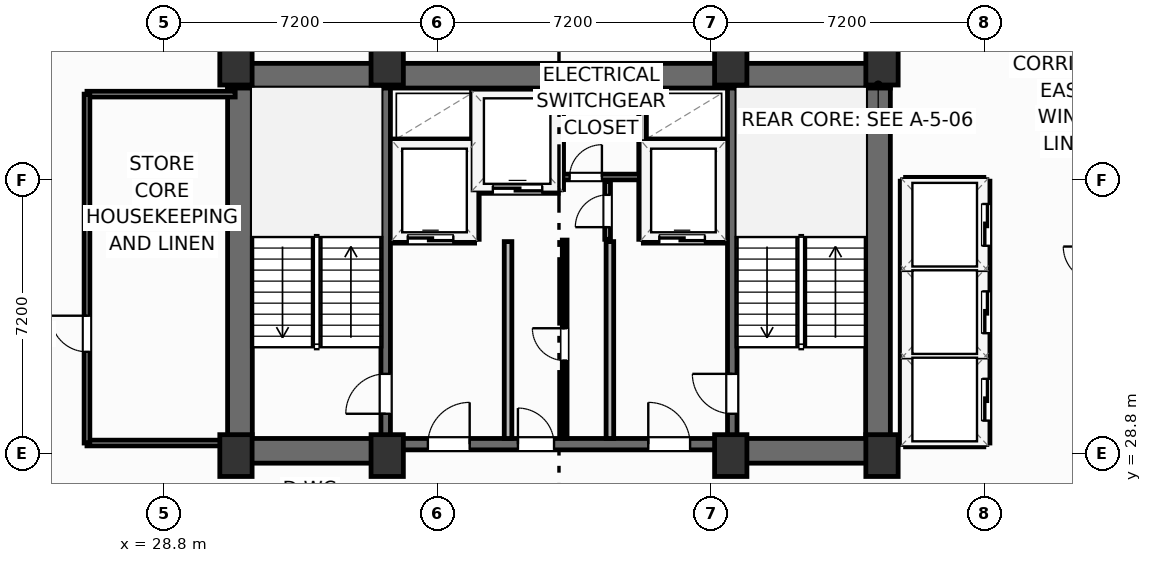
"""IFC4 building model, lengths in metres.
Left out: names, types, materials, properties, quantities, classifications, styles, units other than length and angle.
Written with IfcOpenShell. Run it as: python <this file> out.ifc"""

import sys

from ifc_helpers import new_model, si_unit, direction, frame, frame_2d, origin, origin_2d, place, context, subcontext, project, spatial, rectangle, extrude, element, fill, save


model = new_model("IFC4")
c1 = context("Model", 3, precision=1e-05, world=origin(), true_north=direction((0.0, 1.0)))
c2 = subcontext(c1, "Body", "Model", "MODEL_VIEW")
j1 = project(units=[si_unit("LENGTHUNIT", "METRE"), si_unit("PLANEANGLEUNIT", "RADIAN")], contexts=[c1])
p1 = place(None, origin())
s1 = spatial("IfcSite", under=j1, at=p1, CompositionType="ELEMENT")
p2 = place(p1, origin())
s2 = spatial("IfcBuilding", under=s1, at=p2, CompositionType="ELEMENT")
p3 = place(p2, frame((0.0, 0.0, 196.8)))
s3 = spatial("IfcBuildingStorey", under=s2, at=p3, CompositionType="ELEMENT", Elevation=196.8)
for number, where, z_axis, x_axis in (
    (1, (30.7, 28.75, 0.0), (0.0, 0.0, 1.0), (1.0, 0.0, 0.0)),
    (2, (34.68, 28.75, 0.0), (0.0, 0.0, 1.0), (1.0, 0.0, 0.0)),
    (3, (43.72, 28.75, 0.0), (0.0, 0.0, 1.0), (1.0, 0.0, 0.0)),
    (4, (47.7, 28.75, 0.0), (0.0, 0.0, 1.0), (1.0, 0.0, 0.0)),
    (5, (30.7, 39.05, 0.0), (0.0, 0.0, 1.0), (1.0, 0.0, 0.0)),
    (6, (34.68, 39.05, 0.0), (0.0, 0.0, 1.0), (1.0, 0.0, 0.0)),
    (7, (43.72, 39.05, 0.0), (0.0, 0.0, 1.0), (1.0, 0.0, 0.0)),
    (8, (47.7, 39.05, 0.0), (0.0, 0.0, 1.0), (1.0, 0.0, 0.0)),
):
    element("IfcColumn", number, at=place(p3, frame(where, z_axis=z_axis, x_axis=x_axis)), inside=s3, PredefinedType="COLUMN", context=c2, shape_type="SweptSolid", body=[
        extrude(rectangle(XDim=0.85, YDim=1.1, at=origin_2d()), origin(), (0.0, 0.0, 1.0), 3.7),
    ])
p4 = place(p3, frame((30.48, 38.745, 0.0), z_axis=(0.0, 0.0, 1.0), x_axis=(1.0, 0.0, 0.0)))
e9 = element("IfcWall", 9, at=p4, inside=s3, PredefinedType="SHEAR", context=c2, shape_type="SweptSolid", body=[
    extrude(rectangle(XDim=17.44, YDim=0.65, at=frame_2d((8.72, 0.0))), origin(), (0.0, 0.0, 1.0), 3.45),
])
for number, where, z_axis, x_axis in (
    (10, (30.805, 29.2, 0.0), (0.0, 0.0, 1.0), (0.0, 1.0, 0.0)),
    (11, (47.595, 29.2, 0.0), (0.0, 0.0, 1.0), (0.0, 1.0, 0.0)),
):
    element("IfcWall", number, at=place(p3, frame(where, z_axis=z_axis, x_axis=x_axis)), inside=s3, PredefinedType="SHEAR", context=c2, shape_type="SweptSolid", body=[
        extrude(rectangle(XDim=9.22, YDim=0.65, at=frame_2d((4.61, 0.0))), origin(), (0.0, 0.0, 1.0), 3.45),
    ])
p5 = place(p3, frame((30.48, 28.875, 0.0), z_axis=(0.0, 0.0, 1.0), x_axis=(1.0, 0.0, 0.0)))
e12 = element("IfcWall", 12, at=p5, inside=s3, PredefinedType="SHEAR", context=c2, shape_type="SweptSolid", body=[
    extrude(rectangle(XDim=4.32, YDim=0.65, at=frame_2d((2.16, 0.0))), origin(), (0.0, 0.0, 1.0), 3.45),
])
p6 = place(p3, frame((43.6, 28.875, 0.0), z_axis=(0.0, 0.0, 1.0), x_axis=(1.0, 0.0, 0.0)))
e13 = element("IfcWall", 13, at=p6, inside=s3, PredefinedType="SHEAR", context=c2, shape_type="SweptSolid", body=[
    extrude(rectangle(XDim=4.32, YDim=0.65, at=frame_2d((2.16, 0.0))), origin(), (0.0, 0.0, 1.0), 3.45),
])
p7 = place(p3, frame((34.8, 29.05, 0.0), z_axis=(0.0, 0.0, 1.0), x_axis=(1.0, 0.0, 0.0)))
e14 = element("IfcWall", 14, at=p7, inside=s3, PredefinedType="SHEAR", context=c2, shape_type="SweptSolid", body=[
    extrude(rectangle(XDim=8.8, YDim=0.3, at=frame_2d((4.4, 0.0))), origin(), (0.0, 0.0, 1.0), 3.45),
])
p8 = place(p7, frame((0.95, 0.0, 0.0)))
e15 = element("IfcOpeningElement", 15, at=p8, cuts=e14, PredefinedType="OPENING", context=c2, shape_type="SweptSolid", body=[
    extrude(rectangle(XDim=1.1, YDim=2.15, at=frame_2d((0.55, 1.075))), frame((0.0, 0.16, 0.0), z_axis=(0.0, -1.0, 0.0), x_axis=(1.0, 0.0, 0.0)), (0.0, 0.0, 1.0), 0.32),
])
p9 = place(p7, frame((6.75, 0.0, 0.0)))
e16 = element("IfcOpeningElement", 16, at=p9, cuts=e14, PredefinedType="OPENING", context=c2, shape_type="SweptSolid", body=[
    extrude(rectangle(XDim=1.1, YDim=2.15, at=frame_2d((0.55, 1.075))), frame((0.0, 0.16, 0.0), z_axis=(0.0, -1.0, 0.0), x_axis=(1.0, 0.0, 0.0)), (0.0, 0.0, 1.0), 0.32),
])
p10 = place(p7, frame((3.32, 0.0, 0.0)))
e17 = element("IfcOpeningElement", 17, at=p10, cuts=e14, PredefinedType="OPENING", context=c2, shape_type="SweptSolid", body=[
    extrude(rectangle(XDim=0.95, YDim=2.15, at=frame_2d((0.475, 1.075))), frame((0.0, 0.16, 0.0), z_axis=(0.0, -1.0, 0.0), x_axis=(1.0, 0.0, 0.0)), (0.0, 0.0, 1.0), 0.32),
])
p11 = place(p3, frame((34.64, 29.2, 0.0), z_axis=(0.0, 0.0, 1.0), x_axis=(0.0, 1.0, 0.0)))
e18 = element("IfcWall", 18, at=p11, inside=s3, PredefinedType="SHEAR", context=c2, shape_type="SweptSolid", body=[
    extrude(rectangle(XDim=9.22, YDim=0.25, at=frame_2d((4.61, 0.0))), origin(), (0.0, 0.0, 1.0), 3.45),
])
p12 = place(p11, frame((0.65, 0.0, 0.0)))
e19 = element("IfcOpeningElement", 19, at=p12, cuts=e18, PredefinedType="OPENING", context=c2, shape_type="SweptSolid", body=[
    extrude(rectangle(XDim=1.05, YDim=2.15, at=frame_2d((0.525, 1.075))), frame((0.0, 0.135, 0.0), z_axis=(0.0, -1.0, 0.0), x_axis=(1.0, 0.0, 0.0)), (0.0, 0.0, 1.0), 0.27),
])
p13 = place(p3, frame((43.76, 29.2, 0.0), z_axis=(0.0, 0.0, 1.0), x_axis=(0.0, 1.0, 0.0)))
e20 = element("IfcWall", 20, at=p13, inside=s3, PredefinedType="SHEAR", context=c2, shape_type="SweptSolid", body=[
    extrude(rectangle(XDim=9.22, YDim=0.25, at=frame_2d((4.61, 0.0))), origin(), (0.0, 0.0, 1.0), 3.45),
])
p14 = place(p13, frame((0.65, 0.0, 0.0)))
e21 = element("IfcOpeningElement", 21, at=p14, cuts=e20, PredefinedType="OPENING", context=c2, shape_type="SweptSolid", body=[
    extrude(rectangle(XDim=1.05, YDim=2.15, at=frame_2d((0.525, 1.075))), frame((0.0, 0.135, 0.0), z_axis=(0.0, -1.0, 0.0), x_axis=(1.0, 0.0, 0.0)), (0.0, 0.0, 1.0), 0.27),
])
for number, where, z_axis, x_axis in (
    (22, (37.86, 29.2, 0.0), (0.0, 0.0, 1.0), (0.0, 1.0, 0.0)),
    (23, (40.54, 29.2, 0.0), (0.0, 0.0, 1.0), (0.0, 1.0, 0.0)),
):
    element("IfcWall", number, at=place(p3, frame(where, z_axis=z_axis, x_axis=x_axis)), inside=s3, PredefinedType="PARTITIONING", context=c2, shape_type="SweptSolid", body=[
        extrude(rectangle(XDim=5.18, YDim=0.2, at=frame_2d((2.59, 0.0))), origin(), (0.0, 0.0, 1.0), 3.45),
    ])
p15 = place(p3, frame((34.8, 34.44, 0.0), z_axis=(0.0, 0.0, 1.0), x_axis=(1.0, 0.0, 0.0)))
e24 = element("IfcWall", 24, at=p15, inside=s3, PredefinedType="PARTITIONING", context=c2, shape_type="SweptSolid", body=[
    extrude(rectangle(XDim=2.18, YDim=0.2, at=frame_2d((1.09, 0.0))), origin(), (0.0, 0.0, 1.0), 3.45),
])
p16 = place(p15, frame((0.42, 0.0, 0.0)))
e25 = element("IfcOpeningElement", 25, at=p16, cuts=e24, PredefinedType="OPENING", context=c2, shape_type="SweptSolid", body=[
    extrude(rectangle(XDim=1.2, YDim=2.2, at=frame_2d((0.6, 1.1))), frame((0.0, 0.11, 0.0), z_axis=(0.0, -1.0, 0.0), x_axis=(1.0, 0.0, 0.0)), (0.0, 0.0, 1.0), 0.22),
])
p17 = place(p3, frame((34.8, 36.98, 0.0), z_axis=(0.0, 0.0, 1.0), x_axis=(1.0, 0.0, 0.0)))
e26 = element("IfcWall", 26, at=p17, inside=s3, PredefinedType="PARTITIONING", context=c2, shape_type="SweptSolid", body=[
    extrude(rectangle(XDim=2.18, YDim=0.2, at=frame_2d((1.09, 0.0))), origin(), (0.0, 0.0, 1.0), 3.45),
])
p18 = place(p3, frame((37.0, 34.44, 0.0), z_axis=(0.0, 0.0, 1.0), x_axis=(0.0, 1.0, 0.0)))
e27 = element("IfcWall", 27, at=p18, inside=s3, PredefinedType="PARTITIONING", context=c2, shape_type="SweptSolid", body=[
    extrude(rectangle(XDim=3.9, YDim=0.2, at=frame_2d((1.95, 0.0))), origin(), (0.0, 0.0, 1.0), 3.45),
])
p19 = place(p3, frame((41.42, 34.44, 0.0), z_axis=(0.0, 0.0, 1.0), x_axis=(1.0, 0.0, 0.0)))
e28 = element("IfcWall", 28, at=p19, inside=s3, PredefinedType="PARTITIONING", context=c2, shape_type="SweptSolid", body=[
    extrude(rectangle(XDim=2.18, YDim=0.2, at=frame_2d((1.09, 0.0))), origin(), (0.0, 0.0, 1.0), 3.45),
])
p20 = place(p19, frame((0.42, 0.0, 0.0)))
e29 = element("IfcOpeningElement", 29, at=p20, cuts=e28, PredefinedType="OPENING", context=c2, shape_type="SweptSolid", body=[
    extrude(rectangle(XDim=1.2, YDim=2.2, at=frame_2d((0.6, 1.1))), frame((0.0, 0.11, 0.0), z_axis=(0.0, -1.0, 0.0), x_axis=(1.0, 0.0, 0.0)), (0.0, 0.0, 1.0), 0.22),
])
p21 = place(p3, frame((41.42, 36.98, 0.0), z_axis=(0.0, 0.0, 1.0), x_axis=(1.0, 0.0, 0.0)))
e30 = element("IfcWall", 30, at=p21, inside=s3, PredefinedType="PARTITIONING", context=c2, shape_type="SweptSolid", body=[
    extrude(rectangle(XDim=2.18, YDim=0.2, at=frame_2d((1.09, 0.0))), origin(), (0.0, 0.0, 1.0), 3.45),
])
p22 = place(p3, frame((41.4, 34.44, 0.0), z_axis=(0.0, 0.0, 1.0), x_axis=(0.0, 1.0, 0.0)))
e31 = element("IfcWall", 31, at=p22, inside=s3, PredefinedType="PARTITIONING", context=c2, shape_type="SweptSolid", body=[
    extrude(rectangle(XDim=3.9, YDim=0.2, at=frame_2d((1.95, 0.0))), origin(), (0.0, 0.0, 1.0), 3.45),
])
p23 = place(p3, frame((37.06, 35.75, 0.0), z_axis=(0.0, 0.0, 1.0), x_axis=(1.0, 0.0, 0.0)))
e32 = element("IfcWall", 32, at=p23, inside=s3, PredefinedType="PARTITIONING", context=c2, shape_type="SweptSolid", body=[
    extrude(rectangle(XDim=2.12, YDim=0.2, at=frame_2d((1.06, 0.0))), origin(), (0.0, 0.0, 1.0), 3.45),
])
p24 = place(p23, frame((0.4, 0.0, 0.0)))
e33 = element("IfcOpeningElement", 33, at=p24, cuts=e32, PredefinedType="OPENING", context=c2, shape_type="SweptSolid", body=[
    extrude(rectangle(XDim=1.3, YDim=2.2, at=frame_2d((0.65, 1.1))), frame((0.0, 0.11, 0.0), z_axis=(0.0, -1.0, 0.0), x_axis=(1.0, 0.0, 0.0)), (0.0, 0.0, 1.0), 0.22),
])
p25 = place(p3, frame((39.22, 35.75, 0.0), z_axis=(0.0, 0.0, 1.0), x_axis=(0.0, 1.0, 0.0)))
e34 = element("IfcWall", 34, at=p25, inside=s3, PredefinedType="PARTITIONING", context=c2, shape_type="SweptSolid", body=[
    extrude(rectangle(XDim=2.59, YDim=0.2, at=frame_2d((1.295, 0.0))), origin(), (0.0, 0.0, 1.0), 3.45),
])
p26 = place(p3, frame((39.3, 36.08, 0.0), z_axis=(0.0, 0.0, 1.0), x_axis=(1.0, 0.0, 0.0)))
e35 = element("IfcWall", 35, at=p26, inside=s3, PredefinedType="PARTITIONING", context=c2, shape_type="SweptSolid", body=[
    extrude(rectangle(XDim=2.02, YDim=0.15, at=frame_2d((1.01, 0.0))), origin(), (0.0, 0.0, 1.0), 3.45),
])
p27 = place(p26, frame((0.18, 0.0, 0.0)))
e36 = element("IfcOpeningElement", 36, at=p27, cuts=e35, PredefinedType="OPENING", context=c2, shape_type="SweptSolid", body=[
    extrude(rectangle(XDim=0.85, YDim=2.05, at=frame_2d((0.425, 1.025))), frame((0.0, 0.085, 0.0), z_axis=(0.0, -1.0, 0.0), x_axis=(1.0, 0.0, 0.0)), (0.0, 0.0, 1.0), 0.17),
])
p28 = place(p3, frame((40.48, 34.44, 0.0), z_axis=(0.0, 0.0, 1.0), x_axis=(0.0, 1.0, 0.0)))
e37 = element("IfcWall", 37, at=p28, inside=s3, PredefinedType="PARTITIONING", context=c2, shape_type="SweptSolid", body=[
    extrude(rectangle(XDim=1.52, YDim=0.15, at=frame_2d((0.76, 0.0))), origin(), (0.0, 0.0, 1.0), 3.45),
])
p29 = place(p28, frame((0.32, 0.0, 0.0)))
e38 = element("IfcOpeningElement", 38, at=p29, cuts=e37, PredefinedType="OPENING", context=c2, shape_type="SweptSolid", body=[
    extrude(rectangle(XDim=0.85, YDim=2.05, at=frame_2d((0.425, 1.025))), frame((0.0, 0.085, 0.0), z_axis=(0.0, -1.0, 0.0), x_axis=(1.0, 0.0, 0.0)), (0.0, 0.0, 1.0), 0.17),
])
p30 = place(p3, frame((39.35, 29.2, 0.0), z_axis=(0.0, 0.0, 1.0), x_axis=(0.0, 1.0, 0.0)))
e39 = element("IfcWall", 39, at=p30, inside=s3, PredefinedType="PARTITIONING", context=c2, shape_type="SweptSolid", body=[
    extrude(rectangle(XDim=5.22, YDim=0.125, at=frame_2d((2.61, 0.0))), origin(), (0.0, 0.0, 1.0), 3.45),
])
p31 = place(p30, frame((2.05, 0.0, 0.0)))
e40 = element("IfcOpeningElement", 40, at=p31, cuts=e39, PredefinedType="OPENING", context=c2, shape_type="SweptSolid", body=[
    extrude(rectangle(XDim=0.85, YDim=2.05, at=frame_2d((0.425, 1.025))), frame((0.0, 0.073, 0.0), z_axis=(0.0, -1.0, 0.0), x_axis=(1.0, 0.0, 0.0)), (0.0, 0.0, 1.0), 0.145),
])
p32 = place(p3, frame((26.78, 29.08, 0.0), z_axis=(0.0, 0.0, 1.0), x_axis=(1.0, 0.0, 0.0)))
e41 = element("IfcWall", 41, at=p32, inside=s3, PredefinedType="PARTITIONING", context=c2, shape_type="SweptSolid", body=[
    extrude(rectangle(XDim=3.7, YDim=0.15, at=frame_2d((1.85, 0.0))), origin(), (0.0, 0.0, 1.0), 3.45),
])
p33 = place(p3, frame((26.78, 38.26, 0.0), z_axis=(0.0, 0.0, 1.0), x_axis=(1.0, 0.0, 0.0)))
e42 = element("IfcWall", 42, at=p33, inside=s3, PredefinedType="PARTITIONING", context=c2, shape_type="SweptSolid", body=[
    extrude(rectangle(XDim=3.9, YDim=0.15, at=frame_2d((1.95, 0.0))), origin(), (0.0, 0.0, 1.0), 3.45),
])
p34 = place(p3, frame((26.78, 29.08, 0.0), z_axis=(0.0, 0.0, 1.0), x_axis=(0.0, 1.0, 0.0)))
e43 = element("IfcWall", 43, at=p34, inside=s3, PredefinedType="PARTITIONING", context=c2, shape_type="SweptSolid", body=[
    extrude(rectangle(XDim=9.18, YDim=0.15, at=frame_2d((4.59, 0.0))), origin(), (0.0, 0.0, 1.0), 3.45),
])
p35 = place(p34, frame((2.4, 0.0, 0.0)))
e44 = element("IfcOpeningElement", 44, at=p35, cuts=e43, PredefinedType="OPENING", context=c2, shape_type="SweptSolid", body=[
    extrude(rectangle(XDim=0.95, YDim=2.05, at=frame_2d((0.475, 1.025))), frame((0.0, 0.085, 0.0), z_axis=(0.0, -1.0, 0.0), x_axis=(1.0, 0.0, 0.0)), (0.0, 0.0, 1.0), 0.17),
])
for number, where, z_axis, x_axis in (
    (45, (48.32, 31.375, 0.0), (0.0, 0.0, 1.0), (1.0, 0.0, 0.0)),
    (46, (48.32, 33.675, 0.0), (0.0, 0.0, 1.0), (1.0, 0.0, 0.0)),
):
    element("IfcWall", number, at=place(p3, frame(where, z_axis=z_axis, x_axis=x_axis)), inside=s3, PredefinedType="PARTITIONING", context=c2, shape_type="SweptSolid", body=[
        extrude(rectangle(XDim=2.06, YDim=0.2, at=frame_2d((1.03, 0.0))), origin(), (0.0, 0.0, 1.0), 3.45),
    ])
p36 = place(p3, frame((48.32, 29.08, 0.0), z_axis=(0.0, 0.0, 1.0), x_axis=(1.0, 0.0, 0.0)))
e47 = element("IfcWall", 47, at=p36, inside=s3, PredefinedType="PARTITIONING", context=c2, shape_type="SweptSolid", body=[
    extrude(rectangle(XDim=2.06, YDim=0.2, at=frame_2d((1.03, 0.0))), origin(), (0.0, 0.0, 1.0), 2.662),
])
p37 = place(p3, frame((48.32, 35.97, 0.0), z_axis=(0.0, 0.0, 1.0), x_axis=(1.0, 0.0, 0.0)))
e48 = element("IfcWall", 48, at=p37, inside=s3, PredefinedType="PARTITIONING", context=c2, shape_type="SweptSolid", body=[
    extrude(rectangle(XDim=2.06, YDim=0.2, at=frame_2d((1.03, 0.0))), origin(), (0.0, 0.0, 1.0), 3.45),
])
p38 = place(p3, frame((48.28, 29.08, 0.0), z_axis=(0.0, 0.0, 1.0), x_axis=(0.0, 1.0, 0.0)))
e49 = element("IfcWall", 49, at=p38, inside=s3, PredefinedType="PARTITIONING", context=c2, shape_type="SweptSolid", body=[
    extrude(rectangle(XDim=6.89, YDim=0.2, at=frame_2d((3.445, 0.0))), origin(), (0.0, 0.0, 1.0), 3.45),
])
p39 = place(p3, frame((50.44, 29.08, 0.0), z_axis=(0.0, 0.0, 1.0), x_axis=(0.0, 1.0, 0.0)))
e50 = element("IfcWall", 50, at=p39, inside=s3, PredefinedType="PARTITIONING", context=c2, shape_type="SweptSolid", body=[
    extrude(rectangle(XDim=6.89, YDim=0.2, at=frame_2d((3.445, 0.0))), origin(), (0.0, 0.0, 1.0), 3.45),
])
p40 = place(p39, frame((0.59, 0.0, 0.0)))
e51 = element("IfcOpeningElement", 51, at=p40, cuts=e50, PredefinedType="OPENING", context=c2, shape_type="SweptSolid", body=[
    extrude(rectangle(XDim=1.1, YDim=2.15, at=frame_2d((0.55, 1.075))), frame((0.0, 0.11, 0.0), z_axis=(0.0, -1.0, 0.0), x_axis=(1.0, 0.0, 0.0)), (0.0, 0.0, 1.0), 0.22),
])
p41 = place(p39, frame((2.89, 0.0, 0.0)))
e52 = element("IfcOpeningElement", 52, at=p41, cuts=e50, PredefinedType="OPENING", context=c2, shape_type="SweptSolid", body=[
    extrude(rectangle(XDim=1.1, YDim=2.15, at=frame_2d((0.55, 1.075))), frame((0.0, 0.11, 0.0), z_axis=(0.0, -1.0, 0.0), x_axis=(1.0, 0.0, 0.0)), (0.0, 0.0, 1.0), 0.22),
])
p42 = place(p39, frame((5.19, 0.0, 0.0)))
e53 = element("IfcOpeningElement", 53, at=p42, cuts=e50, PredefinedType="OPENING", context=c2, shape_type="SweptSolid", body=[
    extrude(rectangle(XDim=1.1, YDim=2.15, at=frame_2d((0.55, 1.075))), frame((0.0, 0.11, 0.0), z_axis=(0.0, -1.0, 0.0), x_axis=(1.0, 0.0, 0.0)), (0.0, 0.0, 1.0), 0.22),
])
p43 = place(p12, origin())
e54 = element("IfcDoor", 54, at=p43, inside=s3, OperationType="SINGLE_SWING_LEFT", PredefinedType="DOOR", context=c2, shape_type="SweptSolid", body=[
    extrude(rectangle(XDim=1.05, YDim=2.15, at=frame_2d((0.525, 1.075))), frame((0.0, 0.025, 0.0), z_axis=(0.0, -1.0, 0.0), x_axis=(1.0, 0.0, 0.0)), (0.0, 0.0, 1.0), 0.05),
])
fill(e19, e54)
p44 = place(p14, origin())
e55 = element("IfcDoor", 55, at=p44, inside=s3, OperationType="SINGLE_SWING_RIGHT", PredefinedType="DOOR", context=c2, shape_type="SweptSolid", body=[
    extrude(rectangle(XDim=1.05, YDim=2.15, at=frame_2d((0.525, 1.075))), frame((0.0, 0.025, 0.0), z_axis=(0.0, -1.0, 0.0), x_axis=(1.0, 0.0, 0.0)), (0.0, 0.0, 1.0), 0.05),
])
fill(e21, e55)
p45 = place(p8, origin())
e56 = element("IfcDoor", 56, at=p45, inside=s3, OperationType="SINGLE_SWING_RIGHT", PredefinedType="DOOR", context=c2, shape_type="SweptSolid", body=[
    extrude(rectangle(XDim=1.1, YDim=2.15, at=frame_2d((0.55, 1.075))), frame((0.0, 0.025, 0.0), z_axis=(0.0, -1.0, 0.0), x_axis=(1.0, 0.0, 0.0)), (0.0, 0.0, 1.0), 0.05),
])
fill(e15, e56)
p46 = place(p9, origin())
e57 = element("IfcDoor", 57, at=p46, inside=s3, OperationType="SINGLE_SWING_LEFT", PredefinedType="DOOR", context=c2, shape_type="SweptSolid", body=[
    extrude(rectangle(XDim=1.1, YDim=2.15, at=frame_2d((0.55, 1.075))), frame((0.0, 0.025, 0.0), z_axis=(0.0, -1.0, 0.0), x_axis=(1.0, 0.0, 0.0)), (0.0, 0.0, 1.0), 0.05),
])
fill(e16, e57)
p47 = place(p16, origin())
e58 = element("IfcDoor", 58, at=p47, inside=s3, OperationType="SLIDING_TO_LEFT", PredefinedType="DOOR", context=c2, shape_type="SweptSolid", body=[
    extrude(rectangle(XDim=1.2, YDim=2.2, at=frame_2d((0.6, 1.1))), frame((0.0, 0.025, 0.0), z_axis=(0.0, -1.0, 0.0), x_axis=(1.0, 0.0, 0.0)), (0.0, 0.0, 1.0), 0.05),
])
fill(e25, e58)
p48 = place(p20, origin())
e59 = element("IfcDoor", 59, at=p48, inside=s3, OperationType="SLIDING_TO_LEFT", PredefinedType="DOOR", context=c2, shape_type="SweptSolid", body=[
    extrude(rectangle(XDim=1.2, YDim=2.2, at=frame_2d((0.6, 1.1))), frame((0.0, 0.025, 0.0), z_axis=(0.0, -1.0, 0.0), x_axis=(1.0, 0.0, 0.0)), (0.0, 0.0, 1.0), 0.05),
])
fill(e29, e59)
p49 = place(p24, origin())
e60 = element("IfcDoor", 60, at=p49, inside=s3, OperationType="SLIDING_TO_LEFT", PredefinedType="DOOR", context=c2, shape_type="SweptSolid", body=[
    extrude(rectangle(XDim=1.3, YDim=2.2, at=frame_2d((0.65, 1.1))), frame((0.0, 0.025, 0.0), z_axis=(0.0, -1.0, 0.0), x_axis=(1.0, 0.0, 0.0)), (0.0, 0.0, 1.0), 0.05),
])
fill(e33, e60)
p50 = place(p27, origin())
e61 = element("IfcDoor", 61, at=p50, inside=s3, OperationType="SINGLE_SWING_RIGHT", PredefinedType="DOOR", context=c2, shape_type="SweptSolid", body=[
    extrude(rectangle(XDim=0.85, YDim=2.05, at=frame_2d((0.425, 1.025))), frame((0.0, 0.025, 0.0), z_axis=(0.0, -1.0, 0.0), x_axis=(1.0, 0.0, 0.0)), (0.0, 0.0, 1.0), 0.05),
])
fill(e36, e61)
p51 = place(p29, origin())
e62 = element("IfcDoor", 62, at=p51, inside=s3, OperationType="SINGLE_SWING_LEFT", PredefinedType="DOOR", context=c2, shape_type="SweptSolid", body=[
    extrude(rectangle(XDim=0.85, YDim=2.05, at=frame_2d((0.425, 1.025))), frame((0.0, 0.025, 0.0), z_axis=(0.0, -1.0, 0.0), x_axis=(1.0, 0.0, 0.0)), (0.0, 0.0, 1.0), 0.05),
])
fill(e38, e62)
p52 = place(p31, origin())
e63 = element("IfcDoor", 63, at=p52, inside=s3, OperationType="SINGLE_SWING_RIGHT", PredefinedType="DOOR", context=c2, shape_type="SweptSolid", body=[
    extrude(rectangle(XDim=0.85, YDim=2.05, at=frame_2d((0.425, 1.025))), frame((0.0, 0.025, 0.0), z_axis=(0.0, -1.0, 0.0), x_axis=(1.0, 0.0, 0.0)), (0.0, 0.0, 1.0), 0.05),
])
fill(e40, e63)
p53 = place(p10, origin())
e64 = element("IfcDoor", 64, at=p53, inside=s3, OperationType="SINGLE_SWING_LEFT", PredefinedType="DOOR", context=c2, shape_type="SweptSolid", body=[
    extrude(rectangle(XDim=0.95, YDim=2.15, at=frame_2d((0.475, 1.075))), frame((0.0, 0.025, 0.0), z_axis=(0.0, -1.0, 0.0), x_axis=(1.0, 0.0, 0.0)), (0.0, 0.0, 1.0), 0.05),
])
fill(e17, e64)
p54 = place(p35, origin())
e65 = element("IfcDoor", 65, at=p54, inside=s3, OperationType="SINGLE_SWING_RIGHT", PredefinedType="DOOR", context=c2, shape_type="SweptSolid", body=[
    extrude(rectangle(XDim=0.95, YDim=2.05, at=frame_2d((0.475, 1.025))), frame((0.0, 0.025, 0.0), z_axis=(0.0, -1.0, 0.0), x_axis=(1.0, 0.0, 0.0)), (0.0, 0.0, 1.0), 0.05),
])
fill(e44, e65)
p55 = place(p40, origin())
e66 = element("IfcDoor", 66, at=p55, inside=s3, OperationType="SLIDING_TO_LEFT", PredefinedType="DOOR", context=c2, shape_type="SweptSolid", body=[
    extrude(rectangle(XDim=1.1, YDim=2.15, at=frame_2d((0.55, 1.075))), frame((0.0, 0.025, 0.0), z_axis=(0.0, -1.0, 0.0), x_axis=(1.0, 0.0, 0.0)), (0.0, 0.0, 1.0), 0.05),
])
fill(e51, e66)
p56 = place(p41, origin())
e67 = element("IfcDoor", 67, at=p56, inside=s3, OperationType="SLIDING_TO_LEFT", PredefinedType="DOOR", context=c2, shape_type="SweptSolid", body=[
    extrude(rectangle(XDim=1.1, YDim=2.15, at=frame_2d((0.55, 1.075))), frame((0.0, 0.025, 0.0), z_axis=(0.0, -1.0, 0.0), x_axis=(1.0, 0.0, 0.0)), (0.0, 0.0, 1.0), 0.05),
])
fill(e52, e67)
p57 = place(p42, origin())
e68 = element("IfcDoor", 68, at=p57, inside=s3, OperationType="SLIDING_TO_LEFT", PredefinedType="DOOR", context=c2, shape_type="SweptSolid", body=[
    extrude(rectangle(XDim=1.1, YDim=2.15, at=frame_2d((0.55, 1.075))), frame((0.0, 0.025, 0.0), z_axis=(0.0, -1.0, 0.0), x_axis=(1.0, 0.0, 0.0)), (0.0, 0.0, 1.0), 0.05),
])
fill(e53, e68)
save(model, sys.argv[1])
